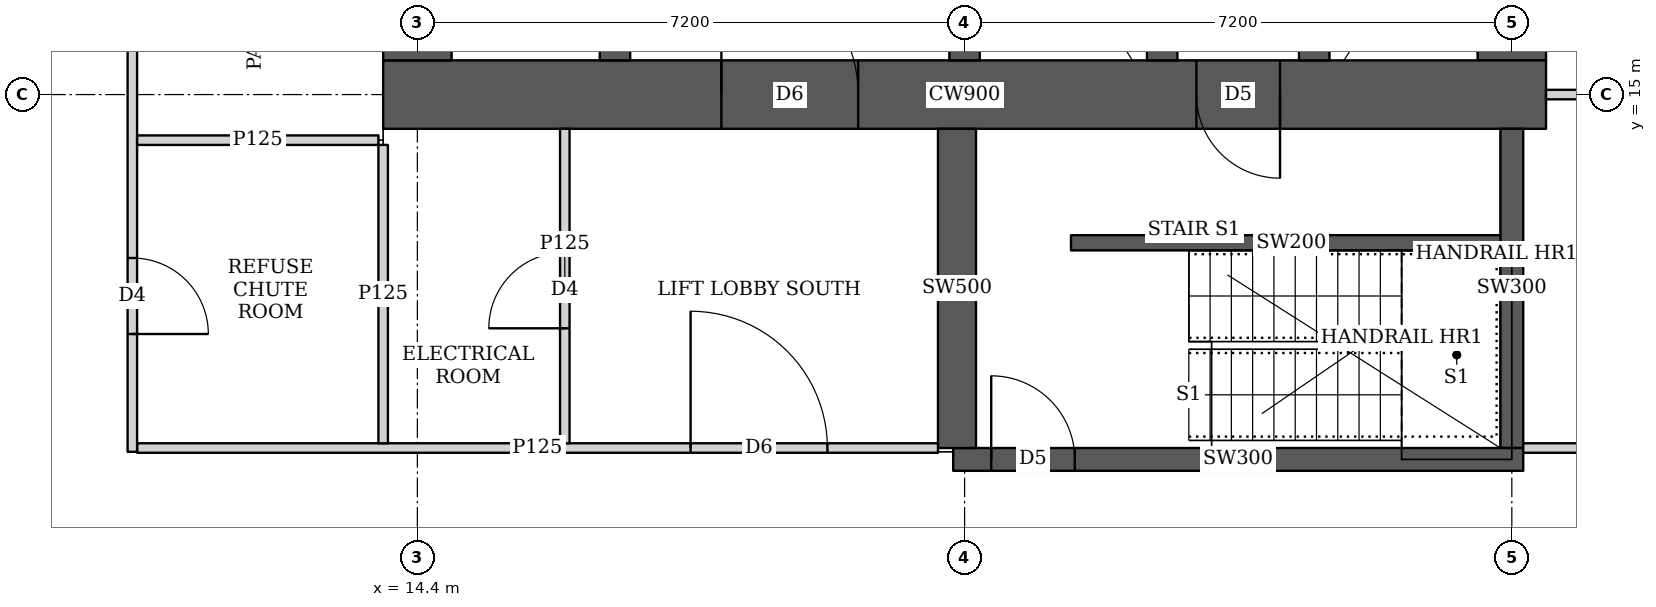
"""IFC4 building model, lengths in metres.
Left out: names, types, materials, properties, quantities, classifications, styles, units other than length and angle.
Written with IfcOpenShell. Run it as: python <this file> out.ifc"""

import sys

from ifc_helpers import new_model, si_unit, direction, frame, frame_2d, origin, place, context, subcontext, project, spatial, rectangle, extrude, element, fill, save


model = new_model("IFC4")
c1 = context("Model", 3, precision=1e-05, world=origin(), true_north=direction((0.0, 1.0)))
c2 = subcontext(c1, "Body", "Model", "MODEL_VIEW")
j1 = project(units=[si_unit("LENGTHUNIT", "METRE"), si_unit("PLANEANGLEUNIT", "RADIAN")], contexts=[c1])
p1 = place(None, origin())
s1 = spatial("IfcSite", under=j1, at=p1, CompositionType="ELEMENT")
p2 = place(p1, origin())
s2 = spatial("IfcBuilding", under=s1, at=p2, CompositionType="ELEMENT")
p3 = place(p2, frame((0.0, 0.0, 208.7)))
s3 = spatial("IfcBuildingStorey", under=s2, at=p3, CompositionType="ELEMENT", Elevation=208.7)
p4 = place(p3, frame((13.95, 15.0, 0.0), z_axis=(0.0, 0.0, 1.0), x_axis=(1.0, 0.0, 0.0)))
e1 = element("IfcWall", 1, at=p4, inside=s3, PredefinedType="SHEAR", context=c2, shape_type="SweptSolid", body=[
    extrude(rectangle(XDim=15.3, YDim=0.9, at=frame_2d((7.65, 0.0))), origin(), (0.0, 0.0, 1.0), 3.75),
])
p5 = place(p4, frame((4.45, 0.0, 0.0)))
e2 = element("IfcOpeningElement", 2, at=p5, cuts=e1, PredefinedType="OPENING", context=c2, shape_type="SweptSolid", body=[
    extrude(rectangle(XDim=1.8, YDim=2.1, at=frame_2d((0.9, 1.05))), frame((0.0, 0.46, 0.0), z_axis=(0.0, -1.0, 0.0), x_axis=(1.0, 0.0, 0.0)), (0.0, 0.0, 1.0), 0.92),
])
p6 = place(p4, frame((10.7, 0.0, 0.0)))
e3 = element("IfcOpeningElement", 3, at=p6, cuts=e1, PredefinedType="OPENING", context=c2, shape_type="SweptSolid", body=[
    extrude(rectangle(XDim=1.1, YDim=2.1, at=frame_2d((0.55, 1.05))), frame((0.0, 0.46, 0.0), z_axis=(0.0, -1.0, 0.0), x_axis=(1.0, 0.0, 0.0)), (0.0, 0.0, 1.0), 0.92),
])
for number, where, z_axis, x_axis in (
    (4, (14.4, 15.45, 0.0), (0.0, 0.0, 1.0), (0.0, 1.0, 0.0)),
    (5, (28.8, 15.45, 0.0), (0.0, 0.0, 1.0), (0.0, 1.0, 0.0)),
):
    element("IfcWall", number, at=place(p3, frame(where, z_axis=z_axis, x_axis=x_axis)), inside=s3, PredefinedType="SHEAR", context=c2, shape_type="SweptSolid", body=[
        extrude(rectangle(XDim=14.1, YDim=0.9, at=frame_2d((7.05, 0.0))), origin(), (0.0, 0.0, 1.0), 3.75),
    ])
p7 = place(p3, frame((17.0, 15.45, 0.0), z_axis=(0.0, 0.0, 1.0), x_axis=(0.0, 1.0, 0.0)))
e6 = element("IfcWall", 6, at=p7, inside=s3, PredefinedType="SHEAR", context=c2, shape_type="SweptSolid", body=[
    extrude(rectangle(XDim=14.1, YDim=0.4, at=frame_2d((7.05, 0.0))), origin(), (0.0, 0.0, 1.0), 3.75),
])
p8 = place(p7, frame((0.925, 0.0, 0.0)))
e7 = element("IfcOpeningElement", 7, at=p8, cuts=e6, PredefinedType="OPENING", context=c2, shape_type="SweptSolid", body=[
    extrude(rectangle(XDim=1.0, YDim=2.1, at=frame_2d((0.5, 1.05))), frame((0.0, 0.21, 0.0), z_axis=(0.0, -1.0, 0.0), x_axis=(1.0, 0.0, 0.0)), (0.0, 0.0, 1.0), 0.42),
])
p9 = place(p7, frame((4.675, 0.0, 0.0)))
e8 = element("IfcOpeningElement", 8, at=p9, cuts=e6, PredefinedType="OPENING", context=c2, shape_type="SweptSolid", body=[
    extrude(rectangle(XDim=1.0, YDim=2.1, at=frame_2d((0.5, 1.05))), frame((0.0, 0.21, 0.0), z_axis=(0.0, -1.0, 0.0), x_axis=(1.0, 0.0, 0.0)), (0.0, 0.0, 1.0), 0.42),
])
p10 = place(p7, frame((8.425, 0.0, 0.0)))
e9 = element("IfcOpeningElement", 9, at=p10, cuts=e6, PredefinedType="OPENING", context=c2, shape_type="SweptSolid", body=[
    extrude(rectangle(XDim=1.0, YDim=2.1, at=frame_2d((0.5, 1.05))), frame((0.0, 0.21, 0.0), z_axis=(0.0, -1.0, 0.0), x_axis=(1.0, 0.0, 0.0)), (0.0, 0.0, 1.0), 0.42),
])
p11 = place(p7, frame((12.175, 0.0, 0.0)))
e10 = element("IfcOpeningElement", 10, at=p11, cuts=e6, PredefinedType="OPENING", context=c2, shape_type="SweptSolid", body=[
    extrude(rectangle(XDim=1.0, YDim=2.1, at=frame_2d((0.5, 1.05))), frame((0.0, 0.21, 0.0), z_axis=(0.0, -1.0, 0.0), x_axis=(1.0, 0.0, 0.0)), (0.0, 0.0, 1.0), 0.42),
])
p12 = place(p3, frame((21.6, 15.45, 0.0), z_axis=(0.0, 0.0, 1.0), x_axis=(0.0, 1.0, 0.0)))
e11 = element("IfcWall", 11, at=p12, inside=s3, PredefinedType="SHEAR", context=c2, shape_type="SweptSolid", body=[
    extrude(rectangle(XDim=14.1, YDim=0.4, at=frame_2d((7.05, 0.0))), origin(), (0.0, 0.0, 1.0), 3.75),
])
p13 = place(p12, frame((0.875, 0.0, 0.0)))
e12 = element("IfcOpeningElement", 12, at=p13, cuts=e11, PredefinedType="OPENING", context=c2, shape_type="SweptSolid", body=[
    extrude(rectangle(XDim=1.1, YDim=2.1, at=frame_2d((0.55, 1.05))), frame((0.0, 0.21, 0.0), z_axis=(0.0, -1.0, 0.0), x_axis=(1.0, 0.0, 0.0)), (0.0, 0.0, 1.0), 0.42),
])
p14 = place(p12, frame((4.625, 0.0, 0.0)))
e13 = element("IfcOpeningElement", 13, at=p14, cuts=e11, PredefinedType="OPENING", context=c2, shape_type="SweptSolid", body=[
    extrude(rectangle(XDim=1.1, YDim=2.1, at=frame_2d((0.55, 1.05))), frame((0.0, 0.21, 0.0), z_axis=(0.0, -1.0, 0.0), x_axis=(1.0, 0.0, 0.0)), (0.0, 0.0, 1.0), 0.42),
])
p15 = place(p12, frame((8.375, 0.0, 0.0)))
e14 = element("IfcOpeningElement", 14, at=p15, cuts=e11, PredefinedType="OPENING", context=c2, shape_type="SweptSolid", body=[
    extrude(rectangle(XDim=1.1, YDim=2.1, at=frame_2d((0.55, 1.05))), frame((0.0, 0.21, 0.0), z_axis=(0.0, -1.0, 0.0), x_axis=(1.0, 0.0, 0.0)), (0.0, 0.0, 1.0), 0.42),
])
p16 = place(p12, frame((12.125, 0.0, 0.0)))
e15 = element("IfcOpeningElement", 15, at=p16, cuts=e11, PredefinedType="OPENING", context=c2, shape_type="SweptSolid", body=[
    extrude(rectangle(XDim=1.1, YDim=2.1, at=frame_2d((0.55, 1.05))), frame((0.0, 0.21, 0.0), z_axis=(0.0, -1.0, 0.0), x_axis=(1.0, 0.0, 0.0)), (0.0, 0.0, 1.0), 0.42),
])
p17 = place(p3, frame((24.2, 15.45, 0.0), z_axis=(0.0, 0.0, 1.0), x_axis=(0.0, 1.0, 0.0)))
e16 = element("IfcWall", 16, at=p17, inside=s3, PredefinedType="SHEAR", context=c2, shape_type="SweptSolid", body=[
    extrude(rectangle(XDim=14.1, YDim=0.4, at=frame_2d((7.05, 0.0))), origin(), (0.0, 0.0, 1.0), 3.75),
])
p18 = place(p3, frame((26.2, 15.45, 0.0), z_axis=(0.0, 0.0, 1.0), x_axis=(0.0, 1.0, 0.0)))
e17 = element("IfcWall", 17, at=p18, inside=s3, PredefinedType="SHEAR", context=c2, shape_type="SweptSolid", body=[
    extrude(rectangle(XDim=3.1, YDim=0.4, at=frame_2d((1.55, 0.0))), origin(), (0.0, 0.0, 1.0), 3.75),
])
p19 = place(p18, frame((0.825, 0.0, 0.0)))
e18 = element("IfcOpeningElement", 18, at=p19, cuts=e17, PredefinedType="OPENING", context=c2, shape_type="SweptSolid", body=[
    extrude(rectangle(XDim=1.2, YDim=2.1, at=frame_2d((0.6, 1.05))), frame((0.0, 0.21, 0.0), z_axis=(0.0, -1.0, 0.0), x_axis=(1.0, 0.0, 0.0)), (0.0, 0.0, 1.0), 0.42),
])
p20 = place(p3, frame((21.45, 10.2, 0.0), z_axis=(0.0, 0.0, 1.0), x_axis=(1.0, 0.0, 0.0)))
e19 = element("IfcWall", 19, at=p20, inside=s3, PredefinedType="SHEAR", context=c2, shape_type="SweptSolid", body=[
    extrude(rectangle(XDim=7.5, YDim=0.3, at=frame_2d((3.75, 0.0))), origin(), (0.0, 0.0, 1.0), 3.75),
])
p21 = place(p20, frame((0.5, 0.0, 0.0)))
e20 = element("IfcOpeningElement", 20, at=p21, cuts=e19, PredefinedType="OPENING", context=c2, shape_type="SweptSolid", body=[
    extrude(rectangle(XDim=1.1, YDim=2.1, at=frame_2d((0.55, 1.05))), frame((0.0, 0.16, 0.0), z_axis=(0.0, -1.0, 0.0), x_axis=(1.0, 0.0, 0.0)), (0.0, 0.0, 1.0), 0.32),
])
p22 = place(p3, frame((21.5, 10.35, 0.0), z_axis=(0.0, 0.0, 1.0), x_axis=(0.0, 1.0, 0.0)))
e21 = element("IfcWall", 21, at=p22, inside=s3, PredefinedType="SHEAR", context=c2, shape_type="SweptSolid", body=[
    extrude(rectangle(XDim=4.2, YDim=0.5, at=frame_2d((2.1, 0.0))), origin(), (0.0, 0.0, 1.0), 3.75),
])
p23 = place(p3, frame((28.8, 10.35, 0.0), z_axis=(0.0, 0.0, 1.0), x_axis=(0.0, 1.0, 0.0)))
e22 = element("IfcWall", 22, at=p23, inside=s3, PredefinedType="SHEAR", context=c2, shape_type="SweptSolid", body=[
    extrude(rectangle(XDim=4.2, YDim=0.3, at=frame_2d((2.1, 0.0))), origin(), (0.0, 0.0, 1.0), 3.75),
])
p24 = place(p3, frame((10.65, 10.3, 0.0), z_axis=(0.0, 0.0, 1.0), x_axis=(0.0, 1.0, 0.0)))
e23 = element("IfcWall", 23, at=p24, inside=s3, PredefinedType="PARTITIONING", context=c2, shape_type="SweptSolid", body=[
    extrude(rectangle(XDim=24.4, YDim=0.125, at=frame_2d((12.2, 0.0))), origin(), (0.0, 0.0, 1.0), 3.5),
])
p25 = place(p24, frame((1.55, 0.0, 0.0)))
e24 = element("IfcOpeningElement", 24, at=p25, cuts=e23, PredefinedType="OPENING", context=c2, shape_type="SweptSolid", body=[
    extrude(rectangle(XDim=1.0, YDim=2.1, at=frame_2d((0.5, 1.05))), frame((0.0, 0.073, 0.0), z_axis=(0.0, -1.0, 0.0), x_axis=(1.0, 0.0, 0.0)), (0.0, 0.0, 1.0), 0.145),
])
p26 = place(p24, frame((6.6, 0.0, 0.0)))
e25 = element("IfcOpeningElement", 25, at=p26, cuts=e23, PredefinedType="OPENING", context=c2, shape_type="SweptSolid", body=[
    extrude(rectangle(XDim=1.0, YDim=2.1, at=frame_2d((0.5, 1.05))), frame((0.0, 0.073, 0.0), z_axis=(0.0, -1.0, 0.0), x_axis=(1.0, 0.0, 0.0)), (0.0, 0.0, 1.0), 0.145),
])
p27 = place(p24, frame((11.4, 0.0, 0.0)))
e26 = element("IfcOpeningElement", 26, at=p27, cuts=e23, PredefinedType="OPENING", context=c2, shape_type="SweptSolid", body=[
    extrude(rectangle(XDim=1.0, YDim=2.1, at=frame_2d((0.5, 1.05))), frame((0.0, 0.073, 0.0), z_axis=(0.0, -1.0, 0.0), x_axis=(1.0, 0.0, 0.0)), (0.0, 0.0, 1.0), 0.145),
])
p28 = place(p24, frame((18.55, 0.0, 0.0)))
e27 = element("IfcOpeningElement", 27, at=p28, cuts=e23, PredefinedType="OPENING", context=c2, shape_type="SweptSolid", body=[
    extrude(rectangle(XDim=1.0, YDim=2.1, at=frame_2d((0.5, 1.05))), frame((0.0, 0.073, 0.0), z_axis=(0.0, -1.0, 0.0), x_axis=(1.0, 0.0, 0.0)), (0.0, 0.0, 1.0), 0.145),
])
p29 = place(p3, frame((10.713, 14.4, 0.0), z_axis=(0.0, 0.0, 1.0), x_axis=(1.0, 0.0, 0.0)))
e28 = element("IfcWall", 28, at=p29, inside=s3, PredefinedType="PARTITIONING", context=c2, shape_type="SweptSolid", body=[
    extrude(rectangle(XDim=3.175, YDim=0.125, at=frame_2d((1.587, 0.0))), origin(), (0.0, 0.0, 1.0), 3.5),
])
p30 = place(p3, frame((13.95, 10.413, 0.0), z_axis=(0.0, 0.0, 1.0), x_axis=(0.0, 1.0, 0.0)))
e29 = element("IfcWall", 29, at=p30, inside=s3, PredefinedType="PARTITIONING", context=c2, shape_type="SweptSolid", body=[
    extrude(rectangle(XDim=3.925, YDim=0.125, at=frame_2d((1.962, 0.0))), origin(), (0.0, 0.0, 1.0), 3.5),
])
p31 = place(p3, frame((10.713, 10.35, 0.0), z_axis=(0.0, 0.0, 1.0), x_axis=(1.0, 0.0, 0.0)))
e30 = element("IfcWall", 30, at=p31, inside=s3, PredefinedType="PARTITIONING", context=c2, shape_type="SweptSolid", body=[
    extrude(rectangle(XDim=10.537, YDim=0.125, at=frame_2d((5.269, 0.0))), origin(), (0.0, 0.0, 1.0), 3.5),
])
p32 = place(p31, frame((7.282, 0.0, 0.0)))
e31 = element("IfcOpeningElement", 31, at=p32, cuts=e30, PredefinedType="OPENING", context=c2, shape_type="SweptSolid", body=[
    extrude(rectangle(XDim=1.8, YDim=2.1, at=frame_2d((0.9, 1.05))), frame((0.0, 0.073, 0.0), z_axis=(0.0, -1.0, 0.0), x_axis=(1.0, 0.0, 0.0)), (0.0, 0.0, 1.0), 0.145),
])
p33 = place(p3, frame((16.34, 10.413, 0.0), z_axis=(0.0, 0.0, 1.0), x_axis=(0.0, 1.0, 0.0)))
e32 = element("IfcWall", 32, at=p33, inside=s3, PredefinedType="PARTITIONING", context=c2, shape_type="SweptSolid", body=[
    extrude(rectangle(XDim=4.137, YDim=0.125, at=frame_2d((2.068, 0.0))), origin(), (0.0, 0.0, 1.0), 3.5),
])
p34 = place(p33, frame((1.512, 0.0, 0.0)))
e33 = element("IfcOpeningElement", 33, at=p34, cuts=e32, PredefinedType="OPENING", context=c2, shape_type="SweptSolid", body=[
    extrude(rectangle(XDim=1.0, YDim=2.1, at=frame_2d((0.5, 1.05))), frame((0.0, 0.073, 0.0), z_axis=(0.0, -1.0, 0.0), x_axis=(1.0, 0.0, 0.0)), (0.0, 0.0, 1.0), 0.145),
])
p35 = place(p3, frame((28.95, 10.35, 0.0), z_axis=(0.0, 0.0, 1.0), x_axis=(1.0, 0.0, 0.0)))
e34 = element("IfcWall", 34, at=p35, inside=s3, PredefinedType="PARTITIONING", context=c2, shape_type="SweptSolid", body=[
    extrude(rectangle(XDim=8.886, YDim=0.125, at=frame_2d((4.443, 0.0))), origin(), (0.0, 0.0, 1.0), 3.5),
])
p36 = place(p3, frame((29.25, 15.0, 0.0), z_axis=(0.0, 0.0, 1.0), x_axis=(1.0, 0.0, 0.0)))
e35 = element("IfcWall", 35, at=p36, inside=s3, PredefinedType="PARTITIONING", context=c2, shape_type="SweptSolid", body=[
    extrude(rectangle(XDim=6.049, YDim=0.125, at=frame_2d((3.024, 0.0))), origin(), (0.0, 0.0, 1.0), 3.5),
])
p37 = place(p3, frame((23.0, 13.05, 0.0), z_axis=(0.0, 0.0, 1.0), x_axis=(1.0, 0.0, 0.0)))
e36 = element("IfcWall", 36, at=p37, inside=s3, PredefinedType="SHEAR", context=c2, shape_type="SweptSolid", body=[
    extrude(rectangle(XDim=5.8, YDim=0.2, at=frame_2d((2.9, 0.0))), origin(), (0.0, 0.0, 1.0), 3.75),
])
p38 = place(p25, origin())
e37 = element("IfcDoor", 37, at=p38, inside=s3, OperationType="SINGLE_SWING_RIGHT", PredefinedType="DOOR", context=c2, shape_type="SweptSolid", body=[
    extrude(rectangle(XDim=1.0, YDim=2.1, at=frame_2d((0.5, 1.05))), frame((0.0, 0.025, 0.0), z_axis=(0.0, -1.0, 0.0), x_axis=(1.0, 0.0, 0.0)), (0.0, 0.0, 1.0), 0.05),
])
fill(e24, e37)
p39 = place(p34, origin())
e38 = element("IfcDoor", 38, at=p39, inside=s3, OperationType="SINGLE_SWING_LEFT", PredefinedType="DOOR", context=c2, shape_type="SweptSolid", body=[
    extrude(rectangle(XDim=1.0, YDim=2.1, at=frame_2d((0.5, 1.05))), frame((0.0, 0.025, 0.0), z_axis=(0.0, -1.0, 0.0), x_axis=(1.0, 0.0, 0.0)), (0.0, 0.0, 1.0), 0.05),
])
fill(e33, e38)
p40 = place(p32, origin())
e39 = element("IfcDoor", 39, at=p40, inside=s3, OperationType="DOUBLE_DOOR_SINGLE_SWING", PredefinedType="DOOR", context=c2, shape_type="SweptSolid", body=[
    extrude(rectangle(XDim=1.8, YDim=2.1, at=frame_2d((0.9, 1.05))), frame((0.0, 0.025, 0.0), z_axis=(0.0, -1.0, 0.0), x_axis=(1.0, 0.0, 0.0)), (0.0, 0.0, 1.0), 0.05),
])
fill(e31, e39)
p41 = place(p5, origin())
e40 = element("IfcDoor", 40, at=p41, inside=s3, OperationType="DOUBLE_DOOR_SINGLE_SWING", PredefinedType="DOOR", context=c2, shape_type="SweptSolid", body=[
    extrude(rectangle(XDim=1.8, YDim=2.1, at=frame_2d((0.9, 1.05))), frame((0.0, 0.025, 0.0), z_axis=(0.0, -1.0, 0.0), x_axis=(1.0, 0.0, 0.0)), (0.0, 0.0, 1.0), 0.05),
])
fill(e2, e40)
p42 = place(p6, origin())
e41 = element("IfcDoor", 41, at=p42, inside=s3, OperationType="SINGLE_SWING_LEFT", PredefinedType="DOOR", context=c2, shape_type="SweptSolid", body=[
    extrude(rectangle(XDim=1.1, YDim=2.1, at=frame_2d((0.55, 1.05))), frame((0.0, 0.025, 0.0), z_axis=(0.0, -1.0, 0.0), x_axis=(1.0, 0.0, 0.0)), (0.0, 0.0, 1.0), 0.05),
])
fill(e3, e41)
p43 = place(p21, origin())
e42 = element("IfcDoor", 42, at=p43, inside=s3, OperationType="SINGLE_SWING_LEFT", PredefinedType="DOOR", context=c2, shape_type="SweptSolid", body=[
    extrude(rectangle(XDim=1.1, YDim=2.1, at=frame_2d((0.55, 1.05))), frame((0.0, 0.025, 0.0), z_axis=(0.0, -1.0, 0.0), x_axis=(1.0, 0.0, 0.0)), (0.0, 0.0, 1.0), 0.05),
])
fill(e20, e42)
save(model, sys.argv[1])
